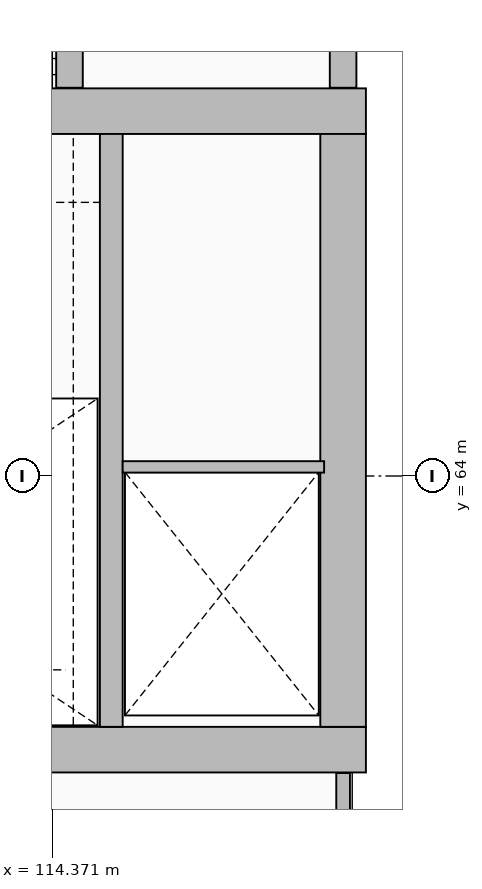
"""IFC4 building model, lengths in metres.
Left out: names, types, materials, properties, quantities, classifications, styles, units other than length and angle.
Written with IfcOpenShell. Run it as: python <this file> out.ifc"""

import sys

from ifc_helpers import new_model, si_unit, direction, frame, frame_2d, origin, place, context, subcontext, project, spatial, rectangle, extrude, element, fill, save


model = new_model("IFC4")
c1 = context("Model", 3, precision=1e-05, world=origin(), true_north=direction((0.0, 1.0)))
c2 = subcontext(c1, "Body", "Model", "MODEL_VIEW")
j1 = project(units=[si_unit("LENGTHUNIT", "METRE"), si_unit("PLANEANGLEUNIT", "RADIAN")], contexts=[c1])
p1 = place(None, origin())
s1 = spatial("IfcSite", under=j1, at=p1, CompositionType="ELEMENT")
p2 = place(p1, origin())
s2 = spatial("IfcBuilding", under=s1, at=p2, CompositionType="ELEMENT")
p3 = place(p2, origin())
s3 = spatial("IfcBuildingStorey", under=s2, at=p3, CompositionType="ELEMENT", Elevation=0.0)
p4 = place(p3, frame((105.48, 60.4, 0.0), z_axis=(0.0, 0.0, 1.0), x_axis=(1.0, 0.0, 0.0)))
e1 = element("IfcWall", 1, at=p4, inside=s3, PredefinedType="SHEAR", context=c2, shape_type="SweptSolid", body=[
    extrude(rectangle(XDim=13.02, YDim=0.6, at=frame_2d((6.51, 0.0))), origin(), (0.0, 0.0, 1.0), 5.4),
])
p5 = place(p4, frame((1.27, 0.0, 0.0)))
e2 = element("IfcOpeningElement", 2, at=p5, cuts=e1, PredefinedType="OPENING", context=c2, shape_type="SweptSolid", body=[
    extrude(rectangle(XDim=1.15, YDim=2.25, at=frame_2d((0.575, 1.125))), frame((0.0, 0.31, 0.0), z_axis=(0.0, -1.0, 0.0), x_axis=(1.0, 0.0, 0.0)), (0.0, 0.0, 1.0), 0.62),
])
p6 = place(p4, frame((10.475, 0.0, 0.0)))
e3 = element("IfcOpeningElement", 3, at=p6, cuts=e1, PredefinedType="OPENING", context=c2, shape_type="SweptSolid", body=[
    extrude(rectangle(XDim=1.3, YDim=2.3, at=frame_2d((0.65, 1.15))), frame((0.0, 0.31, 0.0), z_axis=(0.0, -1.0, 0.0), x_axis=(1.0, 0.0, 0.0)), (0.0, 0.0, 1.0), 0.62),
])
p7 = place(p3, frame((105.48, 68.8, 0.0), z_axis=(0.0, 0.0, 1.0), x_axis=(1.0, 0.0, 0.0)))
e4 = element("IfcWall", 4, at=p7, inside=s3, PredefinedType="SHEAR", context=c2, shape_type="SweptSolid", body=[
    extrude(rectangle(XDim=13.02, YDim=0.6, at=frame_2d((6.51, 0.0))), origin(), (0.0, 0.0, 1.0), 5.4),
])
p8 = place(p3, frame((118.2, 60.7, 0.0), z_axis=(0.0, 0.0, 1.0), x_axis=(0.0, 1.0, 0.0)))
e5 = element("IfcWall", 5, at=p8, inside=s3, PredefinedType="SHEAR", context=c2, shape_type="SweptSolid", body=[
    extrude(rectangle(XDim=7.8, YDim=0.6, at=frame_2d((3.9, 0.0))), origin(), (0.0, 0.0, 1.0), 5.4),
])
p9 = place(p3, frame((115.15, 60.7, 0.0), z_axis=(0.0, 0.0, 1.0), x_axis=(0.0, 1.0, 0.0)))
e6 = element("IfcWall", 6, at=p9, inside=s3, PredefinedType="SHEAR", context=c2, shape_type="SweptSolid", body=[
    extrude(rectangle(XDim=7.8, YDim=0.3, at=frame_2d((3.9, 0.0))), origin(), (0.0, 0.0, 1.0), 5.4),
])
p10 = place(p3, frame((115.3, 64.12, 0.0), z_axis=(0.0, 0.0, 1.0), x_axis=(1.0, 0.0, 0.0)))
e7 = element("IfcWall", 7, at=p10, inside=s3, PredefinedType="PARTITIONING", context=c2, shape_type="SweptSolid", body=[
    extrude(rectangle(XDim=2.65, YDim=0.15, at=frame_2d((1.325, 0.0))), origin(), (0.0, 0.0, 1.0), 5.12),
])
p11 = place(p3, frame((114.6, 69.108, 0.0), z_axis=(0.0, 0.0, 1.0), x_axis=(0.0, 1.0, 0.0)))
e8 = element("IfcWall", 8, at=p11, inside=s3, PredefinedType="SOLIDWALL", context=c2, shape_type="SweptSolid", body=[
    extrude(rectangle(XDim=7.209, YDim=0.35, at=frame_2d((3.604, 0.0))), origin(), (0.0, 0.0, 1.0), 5.12),
])
p12 = place(p11, frame((4.785, 0.0, 0.0)))
e9 = element("IfcOpeningElement", 9, at=p12, cuts=e8, PredefinedType="OPENING", context=c2, shape_type="SweptSolid", body=[
    extrude(rectangle(XDim=1.1, YDim=2.25, at=frame_2d((0.55, 1.125))), frame((0.0, 0.185, 0.0), z_axis=(0.0, -1.0, 0.0), x_axis=(1.0, 0.0, 0.0)), (0.0, 0.0, 1.0), 0.37),
])
p13 = place(p3, frame((118.2, 56.183, 0.0), z_axis=(0.0, 0.0, 1.0), x_axis=(0.0, 1.0, 0.0)))
e10 = element("IfcWall", 10, at=p13, inside=s3, PredefinedType="PARTITIONING", context=c2, shape_type="SweptSolid", body=[
    extrude(rectangle(XDim=3.909, YDim=0.18, at=frame_2d((1.955, 0.0))), origin(), (0.0, 0.0, 1.0), 5.12),
])
p14 = place(p3, frame((118.2, 69.108, 0.0), z_axis=(0.0, 0.0, 1.0), x_axis=(0.0, 1.0, 0.0)))
e11 = element("IfcWall", 11, at=p14, inside=s3, PredefinedType="SOLIDWALL", context=c2, shape_type="SweptSolid", body=[
    extrude(rectangle(XDim=6.677, YDim=0.35, at=frame_2d((3.339, 0.0))), origin(), (0.0, 0.0, 1.0), 5.12),
])
p15 = place(p6, frame((1.3, 0.0, 0.0), z_axis=(0.0, 0.0, 1.0), x_axis=(-1.0, 0.0, 0.0)))
e12 = element("IfcDoor", 12, at=p15, inside=s3, OperationType="DOUBLE_DOOR_SLIDING", PredefinedType="DOOR", context=c2, shape_type="SweptSolid", body=[
    extrude(rectangle(XDim=1.3, YDim=2.3, at=frame_2d((0.65, 1.15))), frame((0.0, 0.025, 0.0), z_axis=(0.0, -1.0, 0.0), x_axis=(1.0, 0.0, 0.0)), (0.0, 0.0, 1.0), 0.05),
])
fill(e3, e12)
save(model, sys.argv[1])
